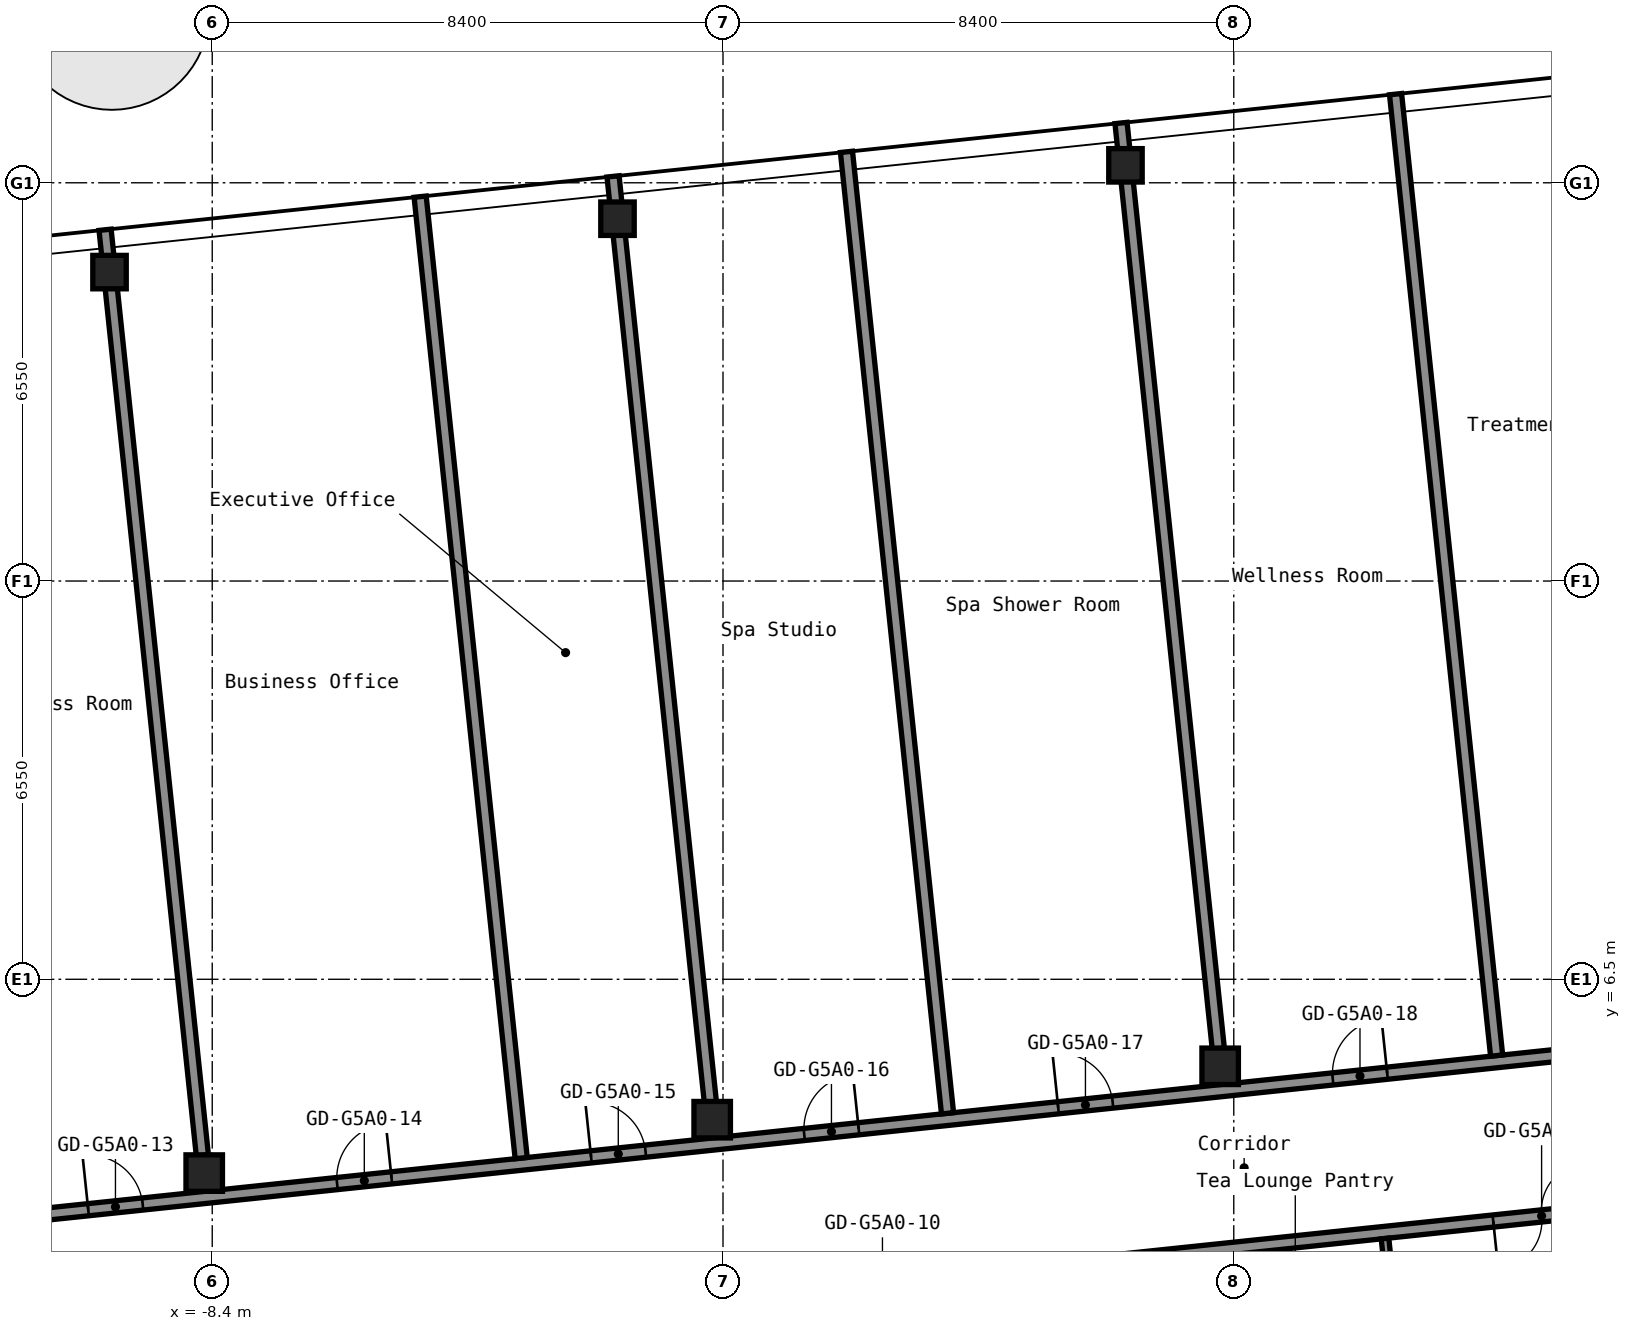
"""IFC4 building model, lengths in metres.
Left out: names, types, materials, properties, quantities, classifications, styles, units other than length and angle.
Written with IfcOpenShell. Run it as: python <this file> out.ifc"""

import sys

from ifc_helpers import new_model, si_unit, direction, frame, frame_2d, origin, origin_2d, place, context, subcontext, project, spatial, rectangle, hollow_rectangle, extrude, element, fill, save


model = new_model("IFC4")
c1 = context("Model", 3, precision=1e-05, world=origin(), true_north=direction((0.0, 1.0)))
c2 = subcontext(c1, "Body", "Model", "MODEL_VIEW")
j1 = project(units=[si_unit("LENGTHUNIT", "METRE"), si_unit("PLANEANGLEUNIT", "RADIAN")], contexts=[c1])
p1 = place(None, origin())
s1 = spatial("IfcSite", under=j1, at=p1, CompositionType="ELEMENT")
p2 = place(p1, origin())
s2 = spatial("IfcBuilding", under=s1, at=p2, CompositionType="ELEMENT")
p3 = place(p2, frame((0.0, 0.0, 239.0)))
s3 = spatial("IfcBuildingStorey", under=s2, at=p3, CompositionType="ELEMENT", Elevation=239.0)
p4 = place(p3, frame((-8.532, 3.312, 0.0), z_axis=(0.0, 0.0, 1.0), x_axis=(1.0, 0.0, 0.0)))
e1 = element("IfcColumn", 1, at=p4, inside=s3, PredefinedType="COLUMN", context=c2, shape_type="SweptSolid", body=[
    extrude(hollow_rectangle(XDim=0.6, YDim=0.6, WallThickness=0.025, InnerFilletRadius=0.038, OuterFilletRadius=0.062, at=origin_2d()), origin(), (0.0, 0.0, 1.0), 2.75),
])
p5 = place(p3, frame((-10.089, 18.131, 0.0), z_axis=(0.0, 0.0, 1.0), x_axis=(1.0, 0.0, 0.0)))
e2 = element("IfcColumn", 2, at=p5, inside=s3, PredefinedType="COLUMN", context=c2, shape_type="SweptSolid", body=[
    extrude(hollow_rectangle(XDim=0.55, YDim=0.55, WallThickness=0.022, InnerFilletRadius=0.033, OuterFilletRadius=0.055, at=origin_2d()), origin(), (0.0, 0.0, 1.0), 2.75),
])
p6 = place(p3, frame((-0.178, 4.191, 0.0), z_axis=(0.0, 0.0, 1.0), x_axis=(1.0, 0.0, 0.0)))
e3 = element("IfcColumn", 3, at=p6, inside=s3, PredefinedType="COLUMN", context=c2, shape_type="SweptSolid", body=[
    extrude(hollow_rectangle(XDim=0.6, YDim=0.6, WallThickness=0.025, InnerFilletRadius=0.038, OuterFilletRadius=0.062, at=origin_2d()), origin(), (0.0, 0.0, 1.0), 2.75),
])
p7 = place(p3, frame((-1.735, 19.009, 0.0), z_axis=(0.0, 0.0, 1.0), x_axis=(1.0, 0.0, 0.0)))
e4 = element("IfcColumn", 4, at=p7, inside=s3, PredefinedType="COLUMN", context=c2, shape_type="SweptSolid", body=[
    extrude(hollow_rectangle(XDim=0.55, YDim=0.55, WallThickness=0.022, InnerFilletRadius=0.033, OuterFilletRadius=0.055, at=origin_2d()), origin(), (0.0, 0.0, 1.0), 2.75),
])
p8 = place(p3, frame((8.176, 5.069, 0.0), z_axis=(0.0, 0.0, 1.0), x_axis=(1.0, 0.0, 0.0)))
e5 = element("IfcColumn", 5, at=p8, inside=s3, PredefinedType="COLUMN", context=c2, shape_type="SweptSolid", body=[
    extrude(hollow_rectangle(XDim=0.6, YDim=0.6, WallThickness=0.025, InnerFilletRadius=0.038, OuterFilletRadius=0.062, at=origin_2d()), origin(), (0.0, 0.0, 1.0), 2.75),
])
p9 = place(p3, frame((6.619, 19.887, 0.0), z_axis=(0.0, 0.0, 1.0), x_axis=(1.0, 0.0, 0.0)))
e6 = element("IfcColumn", 6, at=p9, inside=s3, PredefinedType="COLUMN", context=c2, shape_type="SweptSolid", body=[
    extrude(hollow_rectangle(XDim=0.55, YDim=0.55, WallThickness=0.022, InnerFilletRadius=0.033, OuterFilletRadius=0.055, at=origin_2d()), origin(), (0.0, 0.0, 1.0), 2.75),
])
p10 = place(p3, frame((-16.572, -0.549, 0.0), z_axis=(0.0, 0.0, 1.0), x_axis=(0.994521146831, 0.104535584879, 0.0)))
e7 = element("IfcWall", 7, at=p10, inside=s3, PredefinedType="PARTITIONING", context=c2, shape_type="SweptSolid", body=[
    extrude(rectangle(XDim=33.561, YDim=0.2, at=frame_2d((16.78, 0.0))), origin(), (0.0, 0.0, 1.0), 2.75),
])
p11 = place(p10, frame((1.4, 0.0, 0.0)))
e8 = element("IfcOpeningElement", 8, at=p11, cuts=e7, PredefinedType="OPENING", context=c2, shape_type="SweptSolid", body=[
    extrude(rectangle(XDim=0.9, YDim=2.1, at=frame_2d((0.45, 1.05))), frame((0.0, 0.11, 0.0), z_axis=(0.0, -1.0, 0.0), x_axis=(1.0, 0.0, 0.0)), (0.0, 0.0, 1.0), 0.22),
])
p12 = place(p10, frame((5.6, 0.0, 0.0)))
e9 = element("IfcOpeningElement", 9, at=p12, cuts=e7, PredefinedType="OPENING", context=c2, shape_type="SweptSolid", body=[
    extrude(rectangle(XDim=0.9, YDim=2.1, at=frame_2d((0.45, 1.05))), frame((0.0, 0.11, 0.0), z_axis=(0.0, -1.0, 0.0), x_axis=(1.0, 0.0, 0.0)), (0.0, 0.0, 1.0), 0.22),
])
p13 = place(p10, frame((12.1, 0.0, 0.0)))
e10 = element("IfcOpeningElement", 10, at=p13, cuts=e7, PredefinedType="OPENING", context=c2, shape_type="SweptSolid", body=[
    extrude(rectangle(XDim=1.0, YDim=2.1, at=frame_2d((0.5, 1.05))), frame((0.0, 0.11, 0.0), z_axis=(0.0, -1.0, 0.0), x_axis=(1.0, 0.0, 0.0)), (0.0, 0.0, 1.0), 0.22),
])
p14 = place(p10, frame((18.8, 0.0, 0.0)))
e11 = element("IfcOpeningElement", 11, at=p14, cuts=e7, PredefinedType="OPENING", context=c2, shape_type="SweptSolid", body=[
    extrude(rectangle(XDim=1.0, YDim=2.1, at=frame_2d((0.5, 1.05))), frame((0.0, 0.11, 0.0), z_axis=(0.0, -1.0, 0.0), x_axis=(1.0, 0.0, 0.0)), (0.0, 0.0, 1.0), 0.22),
])
p15 = place(p10, frame((29.4, 0.0, 0.0)))
e12 = element("IfcOpeningElement", 12, at=p15, cuts=e7, PredefinedType="OPENING", context=c2, shape_type="SweptSolid", body=[
    extrude(rectangle(XDim=1.6, YDim=2.1, at=frame_2d((0.8, 1.05))), frame((0.0, 0.11, 0.0), z_axis=(0.0, -1.0, 0.0), x_axis=(1.0, 0.0, 0.0)), (0.0, 0.0, 1.0), 0.22),
])
p16 = place(p3, frame((-16.805, 2.041, 0.0), z_axis=(0.0, 0.0, 1.0), x_axis=(0.994521146831, 0.104535584879, 0.0)))
e13 = element("IfcWall", 13, at=p16, inside=s3, PredefinedType="PARTITIONING", context=c2, shape_type="SweptSolid", body=[
    extrude(rectangle(XDim=33.561, YDim=0.2, at=frame_2d((16.78, 0.0))), origin(), (0.0, 0.0, 1.0), 2.75),
])
p17 = place(p16, frame((2.201, 0.0, 0.0)))
e14 = element("IfcOpeningElement", 14, at=p17, cuts=e13, PredefinedType="OPENING", context=c2, shape_type="SweptSolid", body=[
    extrude(rectangle(XDim=0.9, YDim=2.1, at=frame_2d((0.45, 1.05))), frame((0.0, 0.11, 0.0), z_axis=(0.0, -1.0, 0.0), x_axis=(1.0, 0.0, 0.0)), (0.0, 0.0, 1.0), 0.22),
])
p18 = place(p16, frame((6.401, 0.0, 0.0)))
e15 = element("IfcOpeningElement", 15, at=p18, cuts=e13, PredefinedType="OPENING", context=c2, shape_type="SweptSolid", body=[
    extrude(rectangle(XDim=0.9, YDim=2.1, at=frame_2d((0.45, 1.05))), frame((0.0, 0.11, 0.0), z_axis=(0.0, -1.0, 0.0), x_axis=(1.0, 0.0, 0.0)), (0.0, 0.0, 1.0), 0.22),
])
p19 = place(p16, frame((10.516, 0.0, 0.0)))
e16 = element("IfcOpeningElement", 16, at=p19, cuts=e13, PredefinedType="OPENING", context=c2, shape_type="SweptSolid", body=[
    extrude(rectangle(XDim=0.9, YDim=2.1, at=frame_2d((0.45, 1.05))), frame((0.0, 0.11, 0.0), z_axis=(0.0, -1.0, 0.0), x_axis=(1.0, 0.0, 0.0)), (0.0, 0.0, 1.0), 0.22),
])
p20 = place(p16, frame((14.716, 0.0, 0.0)))
e17 = element("IfcOpeningElement", 17, at=p20, cuts=e13, PredefinedType="OPENING", context=c2, shape_type="SweptSolid", body=[
    extrude(rectangle(XDim=0.9, YDim=2.1, at=frame_2d((0.45, 1.05))), frame((0.0, 0.11, 0.0), z_axis=(0.0, -1.0, 0.0), x_axis=(1.0, 0.0, 0.0)), (0.0, 0.0, 1.0), 0.22),
])
p21 = place(p16, frame((18.241, 0.0, 0.0)))
e18 = element("IfcOpeningElement", 18, at=p21, cuts=e13, PredefinedType="OPENING", context=c2, shape_type="SweptSolid", body=[
    extrude(rectangle(XDim=0.9, YDim=2.1, at=frame_2d((0.45, 1.05))), frame((0.0, 0.11, 0.0), z_axis=(0.0, -1.0, 0.0), x_axis=(1.0, 0.0, 0.0)), (0.0, 0.0, 1.0), 0.22),
])
p22 = place(p16, frame((22.441, 0.0, 0.0)))
e19 = element("IfcOpeningElement", 19, at=p22, cuts=e13, PredefinedType="OPENING", context=c2, shape_type="SweptSolid", body=[
    extrude(rectangle(XDim=0.9, YDim=2.1, at=frame_2d((0.45, 1.05))), frame((0.0, 0.11, 0.0), z_axis=(0.0, -1.0, 0.0), x_axis=(1.0, 0.0, 0.0)), (0.0, 0.0, 1.0), 0.22),
])
p23 = place(p16, frame((26.981, 0.0, 0.0)))
e20 = element("IfcOpeningElement", 20, at=p23, cuts=e13, PredefinedType="OPENING", context=c2, shape_type="SweptSolid", body=[
    extrude(rectangle(XDim=0.9, YDim=2.1, at=frame_2d((0.45, 1.05))), frame((0.0, 0.11, 0.0), z_axis=(0.0, -1.0, 0.0), x_axis=(1.0, 0.0, 0.0)), (0.0, 0.0, 1.0), 0.22),
])
p24 = place(p16, frame((31.181, 0.0, 0.0)))
e21 = element("IfcOpeningElement", 21, at=p24, cuts=e13, PredefinedType="OPENING", context=c2, shape_type="SweptSolid", body=[
    extrude(rectangle(XDim=0.9, YDim=2.1, at=frame_2d((0.45, 1.05))), frame((0.0, 0.11, 0.0), z_axis=(0.0, -1.0, 0.0), x_axis=(1.0, 0.0, 0.0)), (0.0, 0.0, 1.0), 0.22),
])
p25 = place(p3, frame((-8.562, 3.603, 0.0), z_axis=(0.0, 0.0, 1.0), x_axis=(-0.104523729364, 0.99452239291, 0.0)))
e22 = element("IfcWall", 22, at=p25, inside=s3, PredefinedType="PARTITIONING", context=c2, shape_type="SweptSolid", body=[
    extrude(rectangle(XDim=15.308, YDim=0.2, at=frame_2d((7.654, 0.0))), origin(), (0.0, 0.0, 1.0), 2.75),
])
p26 = place(p3, frame((-3.319, 3.559, 0.0), z_axis=(0.0, 0.0, 1.0), x_axis=(-0.104534518003, 0.994521258971, 0.0)))
e23 = element("IfcWall", 23, at=p26, inside=s3, PredefinedType="PARTITIONING", context=c2, shape_type="SweptSolid", body=[
    extrude(rectangle(XDim=15.9, YDim=0.2, at=frame_2d((7.95, 0.0))), origin(), (0.0, 0.0, 1.0), 2.75),
])
p27 = place(p3, frame((-0.208, 4.481, 0.0), z_axis=(0.0, 0.0, 1.0), x_axis=(-0.104523729364, 0.99452239291, 0.0)))
e24 = element("IfcWall", 24, at=p27, inside=s3, PredefinedType="PARTITIONING", context=c2, shape_type="SweptSolid", body=[
    extrude(rectangle(XDim=15.308, YDim=0.2, at=frame_2d((7.654, 0.0))), origin(), (0.0, 0.0, 1.0), 2.75),
])
p28 = place(p3, frame((3.693, 4.296, 0.0), z_axis=(0.0, 0.0, 1.0), x_axis=(-0.104536114326, 0.99452109118, 0.0)))
e25 = element("IfcWall", 25, at=p28, inside=s3, PredefinedType="PARTITIONING", context=c2, shape_type="SweptSolid", body=[
    extrude(rectangle(XDim=15.9, YDim=0.2, at=frame_2d((7.95, 0.0))), origin(), (0.0, 0.0, 1.0), 2.75),
])
p29 = place(p3, frame((8.146, 5.359, 0.0), z_axis=(0.0, 0.0, 1.0), x_axis=(-0.104523729364, 0.99452239291, 0.0)))
e26 = element("IfcWall", 26, at=p29, inside=s3, PredefinedType="PARTITIONING", context=c2, shape_type="SweptSolid", body=[
    extrude(rectangle(XDim=15.308, YDim=0.2, at=frame_2d((7.654, 0.0))), origin(), (0.0, 0.0, 1.0), 2.75),
])
p30 = place(p3, frame((11.148, -0.25, 0.0), z_axis=(0.0, 0.0, 1.0), x_axis=(-0.104491611519, 0.994525767953, 0.0)))
e27 = element("IfcWall", 27, at=p30, inside=s3, PredefinedType="PARTITIONING", context=c2, shape_type="SweptSolid", body=[
    extrude(rectangle(XDim=2.5, YDim=0.125, at=frame_2d((1.25, 0.0))), origin(), (0.0, 0.0, 1.0), 2.75),
])
p31 = place(p30, frame((0.55, 0.0, 0.0)))
e28 = element("IfcOpeningElement", 28, at=p31, cuts=e27, PredefinedType="OPENING", context=c2, shape_type="SweptSolid", body=[
    extrude(rectangle(XDim=0.9, YDim=2.1, at=frame_2d((0.45, 1.05))), frame((0.0, 0.073, 0.0), z_axis=(0.0, -1.0, 0.0), x_axis=(1.0, 0.0, 0.0)), (0.0, 0.0, 1.0), 0.145),
])
p32 = place(p3, frame((12.723, 5.245, 0.0), z_axis=(0.0, 0.0, 1.0), x_axis=(-0.104519331095, 0.994522855156, 0.0)))
e29 = element("IfcWall", 29, at=p32, inside=s3, PredefinedType="PARTITIONING", context=c2, shape_type="SweptSolid", body=[
    extrude(rectangle(XDim=15.9, YDim=0.2, at=frame_2d((7.95, 0.0))), origin(), (0.0, 0.0, 1.0), 2.75),
])
p33 = place(p15, origin())
e30 = element("IfcDoor", 30, at=p33, inside=s3, OperationType="DOUBLE_DOOR_SINGLE_SWING", PredefinedType="DOOR", context=c2, shape_type="SweptSolid", body=[
    extrude(rectangle(XDim=1.6, YDim=2.1, at=frame_2d((0.8, 1.05))), frame((0.0, 0.025, 0.0), z_axis=(0.0, -1.0, 0.0), x_axis=(1.0, 0.0, 0.0)), (0.0, 0.0, 1.0), 0.05),
])
fill(e12, e30)
p34 = place(p18, origin())
e31 = element("IfcDoor", 31, at=p34, inside=s3, OperationType="SINGLE_SWING_RIGHT", PredefinedType="DOOR", context=c2, shape_type="SweptSolid", body=[
    extrude(rectangle(XDim=0.9, YDim=2.1, at=frame_2d((0.45, 1.05))), frame((0.0, 0.025, 0.0), z_axis=(0.0, -1.0, 0.0), x_axis=(1.0, 0.0, 0.0)), (0.0, 0.0, 1.0), 0.05),
])
fill(e15, e31)
p35 = place(p19, origin())
e32 = element("IfcDoor", 32, at=p35, inside=s3, OperationType="SINGLE_SWING_LEFT", PredefinedType="DOOR", context=c2, shape_type="SweptSolid", body=[
    extrude(rectangle(XDim=0.9, YDim=2.1, at=frame_2d((0.45, 1.05))), frame((0.0, 0.025, 0.0), z_axis=(0.0, -1.0, 0.0), x_axis=(1.0, 0.0, 0.0)), (0.0, 0.0, 1.0), 0.05),
])
fill(e16, e32)
p36 = place(p20, origin())
e33 = element("IfcDoor", 33, at=p36, inside=s3, OperationType="SINGLE_SWING_RIGHT", PredefinedType="DOOR", context=c2, shape_type="SweptSolid", body=[
    extrude(rectangle(XDim=0.9, YDim=2.1, at=frame_2d((0.45, 1.05))), frame((0.0, 0.025, 0.0), z_axis=(0.0, -1.0, 0.0), x_axis=(1.0, 0.0, 0.0)), (0.0, 0.0, 1.0), 0.05),
])
fill(e17, e33)
p37 = place(p21, origin())
e34 = element("IfcDoor", 34, at=p37, inside=s3, OperationType="SINGLE_SWING_LEFT", PredefinedType="DOOR", context=c2, shape_type="SweptSolid", body=[
    extrude(rectangle(XDim=0.9, YDim=2.1, at=frame_2d((0.45, 1.05))), frame((0.0, 0.025, 0.0), z_axis=(0.0, -1.0, 0.0), x_axis=(1.0, 0.0, 0.0)), (0.0, 0.0, 1.0), 0.05),
])
fill(e18, e34)
p38 = place(p22, origin())
e35 = element("IfcDoor", 35, at=p38, inside=s3, OperationType="SINGLE_SWING_RIGHT", PredefinedType="DOOR", context=c2, shape_type="SweptSolid", body=[
    extrude(rectangle(XDim=0.9, YDim=2.1, at=frame_2d((0.45, 1.05))), frame((0.0, 0.025, 0.0), z_axis=(0.0, -1.0, 0.0), x_axis=(1.0, 0.0, 0.0)), (0.0, 0.0, 1.0), 0.05),
])
fill(e19, e35)
p39 = place(p23, origin())
e36 = element("IfcDoor", 36, at=p39, inside=s3, OperationType="SINGLE_SWING_LEFT", PredefinedType="DOOR", context=c2, shape_type="SweptSolid", body=[
    extrude(rectangle(XDim=0.9, YDim=2.1, at=frame_2d((0.45, 1.05))), frame((0.0, 0.025, 0.0), z_axis=(0.0, -1.0, 0.0), x_axis=(1.0, 0.0, 0.0)), (0.0, 0.0, 1.0), 0.05),
])
fill(e20, e36)
save(model, sys.argv[1])
